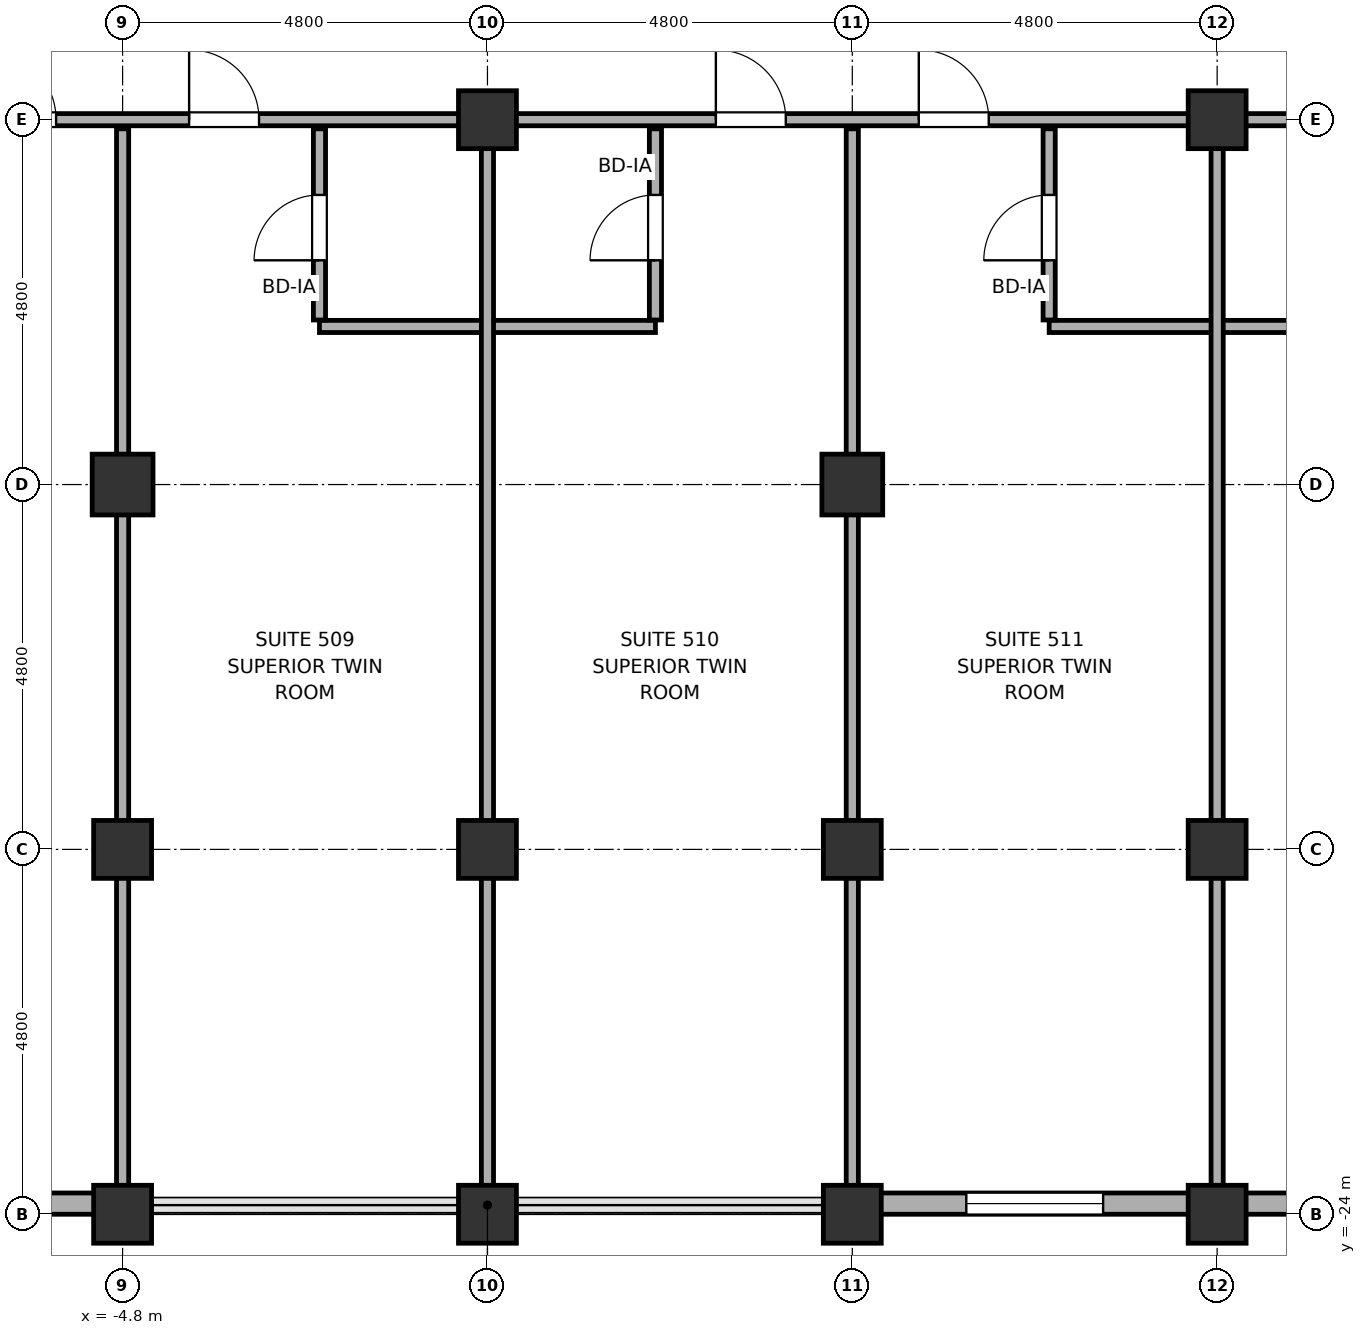
"""IFC4 building model, lengths in metres.
Left out: names, types, materials, properties, quantities, classifications, styles, units other than length and angle.
Written with IfcOpenShell. Run it as: python <this file> out.ifc"""

import sys

from ifc_helpers import new_model, si_unit, direction, frame, frame_2d, origin, origin_2d, place, context, subcontext, project, spatial, rectangle, hollow_rectangle, hollow_circle, extrude, element, fill, save


model = new_model("IFC4")
c1 = context("Model", 3, precision=1e-05, world=origin(), true_north=direction((0.0, 1.0)))
c2 = subcontext(c1, "Body", "Model", "MODEL_VIEW")
j1 = project(units=[si_unit("LENGTHUNIT", "METRE"), si_unit("PLANEANGLEUNIT", "RADIAN")], contexts=[c1])
p1 = place(None, origin())
s1 = spatial("IfcSite", under=j1, at=p1, CompositionType="ELEMENT")
p2 = place(p1, origin())
s2 = spatial("IfcBuilding", under=s1, at=p2, CompositionType="ELEMENT")
p3 = place(p2, frame((0.0, 0.0, 30.0)))
s3 = spatial("IfcBuildingStorey", under=s2, at=p3, CompositionType="ELEMENT", Elevation=30.0)
for number, where, z_axis, x_axis in (
    (1, (-4.8, -24.0, 0.0), (0.0, 0.0, 1.0), (1.0, 0.0, 0.0)),
    (2, (-4.8, -19.2, 0.0), (0.0, 0.0, 1.0), (1.0, 0.0, 0.0)),
):
    element("IfcColumn", number, at=place(p3, frame(where, z_axis=z_axis, x_axis=x_axis)), inside=s3, PredefinedType="COLUMN", context=c2, shape_type="SweptSolid", body=[
        extrude(hollow_circle(Radius=0.381, WallThickness=0.032, at=origin_2d()), origin(), (0.0, 0.0, 1.0), 3.7),
    ])
p4 = place(p3, frame((-4.8, -14.4, 0.0), z_axis=(0.0, 0.0, 1.0), x_axis=(1.0, 0.0, 0.0)))
e3 = element("IfcColumn", 3, at=p4, inside=s3, PredefinedType="COLUMN", context=c2, shape_type="SweptSolid", body=[
    extrude(hollow_rectangle(XDim=0.8, YDim=0.8, WallThickness=0.036, at=origin_2d()), origin(), (0.0, 0.0, 1.0), 3.7),
])
for number, where, z_axis, x_axis in (
    (4, (0.0, -24.0, 0.0), (0.0, 0.0, 1.0), (1.0, 0.0, 0.0)),
    (5, (0.0, -19.2, 0.0), (0.0, 0.0, 1.0), (1.0, 0.0, 0.0)),
    (6, (0.0, -9.6, 0.0), (0.0, 0.0, 1.0), (1.0, 0.0, 0.0)),
    (7, (4.8, -24.0, 0.0), (0.0, 0.0, 1.0), (1.0, 0.0, 0.0)),
    (8, (4.8, -19.2, 0.0), (0.0, 0.0, 1.0), (1.0, 0.0, 0.0)),
):
    element("IfcColumn", number, at=place(p3, frame(where, z_axis=z_axis, x_axis=x_axis)), inside=s3, PredefinedType="COLUMN", context=c2, shape_type="SweptSolid", body=[
        extrude(hollow_circle(Radius=0.381, WallThickness=0.032, at=origin_2d()), origin(), (0.0, 0.0, 1.0), 3.7),
    ])
p5 = place(p3, frame((4.8, -14.4, 0.0), z_axis=(0.0, 0.0, 1.0), x_axis=(1.0, 0.0, 0.0)))
e9 = element("IfcColumn", 9, at=p5, inside=s3, PredefinedType="COLUMN", context=c2, shape_type="SweptSolid", body=[
    extrude(hollow_rectangle(XDim=0.8, YDim=0.8, WallThickness=0.036, at=origin_2d()), origin(), (0.0, 0.0, 1.0), 3.7),
])
for number, where, z_axis, x_axis in (
    (10, (9.6, -24.0, 0.0), (0.0, 0.0, 1.0), (1.0, 0.0, 0.0)),
    (11, (9.6, -19.2, 0.0), (0.0, 0.0, 1.0), (1.0, 0.0, 0.0)),
    (12, (9.6, -9.6, 0.0), (0.0, 0.0, 1.0), (1.0, 0.0, 0.0)),
):
    element("IfcColumn", number, at=place(p3, frame(where, z_axis=z_axis, x_axis=x_axis)), inside=s3, PredefinedType="COLUMN", context=c2, shape_type="SweptSolid", body=[
        extrude(hollow_circle(Radius=0.381, WallThickness=0.032, at=origin_2d()), origin(), (0.0, 0.0, 1.0), 3.7),
    ])
p6 = place(p3, frame((-30.0, -23.86, 0.0), z_axis=(0.0, 0.0, 1.0), x_axis=(1.0, 0.0, 0.0)))
e13 = element("IfcWall", 13, at=p6, inside=s3, PredefinedType="SOLIDWALL", context=c2, shape_type="SweptSolid", body=[
    extrude(rectangle(XDim=25.25, YDim=0.28, at=frame_2d((12.625, 0.0))), origin(), (0.0, 0.0, 1.0), 2.12),
])
p7 = place(p6, frame((7.5, 0.0, 0.75)))
e14 = element("IfcOpeningElement", 14, at=p7, cuts=e13, PredefinedType="OPENING", context=c2, shape_type="SweptSolid", body=[
    extrude(rectangle(XDim=1.8, YDim=1.15, at=frame_2d((0.9, 0.575))), frame((0.0, 0.155, 0.0), z_axis=(0.0, -1.0, 0.0), x_axis=(1.0, 0.0, 0.0)), (0.0, 0.0, 1.0), 0.31),
])
p8 = place(p6, frame((12.3, 0.0, 0.75)))
e15 = element("IfcOpeningElement", 15, at=p8, cuts=e13, PredefinedType="OPENING", context=c2, shape_type="SweptSolid", body=[
    extrude(rectangle(XDim=1.8, YDim=1.15, at=frame_2d((0.9, 0.575))), frame((0.0, 0.155, 0.0), z_axis=(0.0, -1.0, 0.0), x_axis=(1.0, 0.0, 0.0)), (0.0, 0.0, 1.0), 0.31),
])
p9 = place(p6, frame((17.1, 0.0, 0.75)))
e16 = element("IfcOpeningElement", 16, at=p9, cuts=e13, PredefinedType="OPENING", context=c2, shape_type="SweptSolid", body=[
    extrude(rectangle(XDim=1.8, YDim=1.15, at=frame_2d((0.9, 0.575))), frame((0.0, 0.155, 0.0), z_axis=(0.0, -1.0, 0.0), x_axis=(1.0, 0.0, 0.0)), (0.0, 0.0, 1.0), 0.31),
])
p10 = place(p6, frame((21.9, 0.0, 0.75)))
e17 = element("IfcOpeningElement", 17, at=p10, cuts=e13, PredefinedType="OPENING", context=c2, shape_type="SweptSolid", body=[
    extrude(rectangle(XDim=1.8, YDim=1.15, at=frame_2d((0.9, 0.575))), frame((0.0, 0.155, 0.0), z_axis=(0.0, -1.0, 0.0), x_axis=(1.0, 0.0, 0.0)), (0.0, 0.0, 1.0), 0.31),
])
p11 = place(p3, frame((4.75, -23.86, 0.0), z_axis=(0.0, 0.0, 1.0), x_axis=(1.0, 0.0, 0.0)))
e18 = element("IfcWall", 18, at=p11, inside=s3, PredefinedType="SOLIDWALL", context=c2, shape_type="SweptSolid", body=[
    extrude(rectangle(XDim=20.45, YDim=0.28, at=frame_2d((10.225, 0.0))), origin(), (0.0, 0.0, 1.0), 2.12),
])
p12 = place(p11, frame((1.55, 0.0, 0.75)))
e19 = element("IfcOpeningElement", 19, at=p12, cuts=e18, PredefinedType="OPENING", context=c2, shape_type="SweptSolid", body=[
    extrude(rectangle(XDim=1.8, YDim=1.15, at=frame_2d((0.9, 0.575))), frame((0.0, 0.155, 0.0), z_axis=(0.0, -1.0, 0.0), x_axis=(1.0, 0.0, 0.0)), (0.0, 0.0, 1.0), 0.31),
])
p13 = place(p11, frame((6.35, 0.0, 0.75)))
e20 = element("IfcOpeningElement", 20, at=p13, cuts=e18, PredefinedType="OPENING", context=c2, shape_type="SweptSolid", body=[
    extrude(rectangle(XDim=1.8, YDim=1.15, at=frame_2d((0.9, 0.575))), frame((0.0, 0.155, 0.0), z_axis=(0.0, -1.0, 0.0), x_axis=(1.0, 0.0, 0.0)), (0.0, 0.0, 1.0), 0.31),
])
p14 = place(p11, frame((11.15, 0.0, 0.75)))
e21 = element("IfcOpeningElement", 21, at=p14, cuts=e18, PredefinedType="OPENING", context=c2, shape_type="SweptSolid", body=[
    extrude(rectangle(XDim=1.8, YDim=1.15, at=frame_2d((0.9, 0.575))), frame((0.0, 0.155, 0.0), z_axis=(0.0, -1.0, 0.0), x_axis=(1.0, 0.0, 0.0)), (0.0, 0.0, 1.0), 0.31),
])
p15 = place(p3, frame((-2.21, -12.32, 0.0), z_axis=(0.0, 0.0, 1.0), x_axis=(1.0, 0.0, 0.0)))
e22 = element("IfcWall", 22, at=p15, inside=s3, PredefinedType="PARTITIONING", context=c2, shape_type="SweptSolid", body=[
    extrude(rectangle(XDim=4.42, YDim=0.16, at=frame_2d((2.21, 0.0))), origin(), (0.0, 0.0, 1.0), 3.02),
])
p16 = place(p3, frame((7.39, -12.32, 0.0), z_axis=(0.0, 0.0, 1.0), x_axis=(1.0, 0.0, 0.0)))
e23 = element("IfcWall", 23, at=p16, inside=s3, PredefinedType="PARTITIONING", context=c2, shape_type="SweptSolid", body=[
    extrude(rectangle(XDim=4.42, YDim=0.16, at=frame_2d((2.21, 0.0))), origin(), (0.0, 0.0, 1.0), 3.02),
])
p17 = place(p3, frame((-33.31, -9.6, 0.0), z_axis=(0.0, 0.0, 1.0), x_axis=(1.0, 0.0, 0.0)))
e24 = element("IfcWall", 24, at=p17, inside=s3, PredefinedType="PARTITIONING", context=c2, shape_type="SweptSolid", body=[
    extrude(rectangle(XDim=61.82, YDim=0.16, at=frame_2d((30.91, 0.0))), origin(), (0.0, 0.0, 1.0), 2.12),
])
p18 = place(p17, frame((6.679, 0.0, 0.0)))
e25 = element("IfcOpeningElement", 25, at=p18, cuts=e24, PredefinedType="OPENING", context=c2, shape_type="SweptSolid", body=[
    extrude(rectangle(XDim=0.9, YDim=2.02, at=frame_2d((0.45, 1.01))), frame((0.0, 0.095, 0.0), z_axis=(0.0, -1.0, 0.0), x_axis=(1.0, 0.0, 0.0)), (0.0, 0.0, 1.0), 0.19),
])
p19 = place(p17, frame((54.24, 0.0, 0.0)))
e26 = element("IfcOpeningElement", 26, at=p19, cuts=e24, PredefinedType="OPENING", context=c2, shape_type="SweptSolid", body=[
    extrude(rectangle(XDim=0.9, YDim=2.02, at=frame_2d((0.45, 1.01))), frame((0.0, 0.095, 0.0), z_axis=(0.0, -1.0, 0.0), x_axis=(1.0, 0.0, 0.0)), (0.0, 0.0, 1.0), 0.19),
])
p20 = place(p17, frame((10.68, 0.0, 0.0)))
e27 = element("IfcOpeningElement", 27, at=p20, cuts=e24, PredefinedType="OPENING", context=c2, shape_type="SweptSolid", body=[
    extrude(rectangle(XDim=0.92, YDim=2.02, at=frame_2d((0.46, 1.01))), frame((0.0, 0.095, 0.0), z_axis=(0.0, -1.0, 0.0), x_axis=(1.0, 0.0, 0.0)), (0.0, 0.0, 1.0), 0.19),
])
p21 = place(p17, frame((17.115, 0.0, 0.0)))
e28 = element("IfcOpeningElement", 28, at=p21, cuts=e24, PredefinedType="OPENING", context=c2, shape_type="SweptSolid", body=[
    extrude(rectangle(XDim=0.92, YDim=2.02, at=frame_2d((0.46, 1.01))), frame((0.0, 0.095, 0.0), z_axis=(0.0, -1.0, 0.0), x_axis=(1.0, 0.0, 0.0)), (0.0, 0.0, 1.0), 0.19),
])
p22 = place(p17, frame((19.785, 0.0, 0.0)))
e29 = element("IfcOpeningElement", 29, at=p22, cuts=e24, PredefinedType="OPENING", context=c2, shape_type="SweptSolid", body=[
    extrude(rectangle(XDim=0.92, YDim=2.02, at=frame_2d((0.46, 1.01))), frame((0.0, 0.095, 0.0), z_axis=(0.0, -1.0, 0.0), x_axis=(1.0, 0.0, 0.0)), (0.0, 0.0, 1.0), 0.19),
])
p23 = place(p17, frame((26.715, 0.0, 0.0)))
e30 = element("IfcOpeningElement", 30, at=p23, cuts=e24, PredefinedType="OPENING", context=c2, shape_type="SweptSolid", body=[
    extrude(rectangle(XDim=0.92, YDim=2.02, at=frame_2d((0.46, 1.01))), frame((0.0, 0.095, 0.0), z_axis=(0.0, -1.0, 0.0), x_axis=(1.0, 0.0, 0.0)), (0.0, 0.0, 1.0), 0.19),
])
p24 = place(p17, frame((29.385, 0.0, 0.0)))
e31 = element("IfcOpeningElement", 31, at=p24, cuts=e24, PredefinedType="OPENING", context=c2, shape_type="SweptSolid", body=[
    extrude(rectangle(XDim=0.92, YDim=2.02, at=frame_2d((0.46, 1.01))), frame((0.0, 0.095, 0.0), z_axis=(0.0, -1.0, 0.0), x_axis=(1.0, 0.0, 0.0)), (0.0, 0.0, 1.0), 0.19),
])
p25 = place(p17, frame((36.315, 0.0, 0.0)))
e32 = element("IfcOpeningElement", 32, at=p25, cuts=e24, PredefinedType="OPENING", context=c2, shape_type="SweptSolid", body=[
    extrude(rectangle(XDim=0.92, YDim=2.02, at=frame_2d((0.46, 1.01))), frame((0.0, 0.095, 0.0), z_axis=(0.0, -1.0, 0.0), x_axis=(1.0, 0.0, 0.0)), (0.0, 0.0, 1.0), 0.19),
])
p26 = place(p17, frame((38.985, 0.0, 0.0)))
e33 = element("IfcOpeningElement", 33, at=p26, cuts=e24, PredefinedType="OPENING", context=c2, shape_type="SweptSolid", body=[
    extrude(rectangle(XDim=0.92, YDim=2.02, at=frame_2d((0.46, 1.01))), frame((0.0, 0.095, 0.0), z_axis=(0.0, -1.0, 0.0), x_axis=(1.0, 0.0, 0.0)), (0.0, 0.0, 1.0), 0.19),
])
p27 = place(p17, frame((45.915, 0.0, 0.0)))
e34 = element("IfcOpeningElement", 34, at=p27, cuts=e24, PredefinedType="OPENING", context=c2, shape_type="SweptSolid", body=[
    extrude(rectangle(XDim=0.92, YDim=2.02, at=frame_2d((0.46, 1.01))), frame((0.0, 0.095, 0.0), z_axis=(0.0, -1.0, 0.0), x_axis=(1.0, 0.0, 0.0)), (0.0, 0.0, 1.0), 0.19),
])
p28 = place(p17, frame((48.585, 0.0, 0.0)))
e35 = element("IfcOpeningElement", 35, at=p28, cuts=e24, PredefinedType="OPENING", context=c2, shape_type="SweptSolid", body=[
    extrude(rectangle(XDim=0.92, YDim=2.02, at=frame_2d((0.46, 1.01))), frame((0.0, 0.095, 0.0), z_axis=(0.0, -1.0, 0.0), x_axis=(1.0, 0.0, 0.0)), (0.0, 0.0, 1.0), 0.19),
])
p29 = place(p3, frame((-4.8, -23.71, 0.0), z_axis=(0.0, 0.0, 1.0), x_axis=(0.0, 1.0, 0.0)))
e36 = element("IfcWall", 36, at=p29, inside=s3, PredefinedType="PARTITIONING", context=c2, shape_type="SweptSolid", body=[
    extrude(rectangle(XDim=13.99, YDim=0.16, at=frame_2d((6.995, 0.0))), origin(), (0.0, 0.0, 1.0), 2.12),
])
p30 = place(p3, frame((-2.21, -12.235, 0.0), z_axis=(0.0, 0.0, 1.0), x_axis=(0.0, 1.0, 0.0)))
e37 = element("IfcWall", 37, at=p30, inside=s3, PredefinedType="PARTITIONING", context=c2, shape_type="SweptSolid", body=[
    extrude(rectangle(XDim=2.515, YDim=0.16, at=frame_2d((1.258, 0.0))), origin(), (0.0, 0.0, 1.0), 2.12),
])
p31 = place(p30, frame((0.785, 0.0, 0.0)))
e38 = element("IfcOpeningElement", 38, at=p31, cuts=e37, PredefinedType="OPENING", context=c2, shape_type="SweptSolid", body=[
    extrude(rectangle(XDim=0.86, YDim=2.02, at=frame_2d((0.43, 1.01))), frame((0.0, 0.095, 0.0), z_axis=(0.0, -1.0, 0.0), x_axis=(1.0, 0.0, 0.0)), (0.0, 0.0, 1.0), 0.19),
])
p32 = place(p3, frame((0.0, -23.795, 0.0), z_axis=(0.0, 0.0, 1.0), x_axis=(0.0, 1.0, 0.0)))
e39 = element("IfcWall", 39, at=p32, inside=s3, PredefinedType="PARTITIONING", context=c2, shape_type="SweptSolid", body=[
    extrude(rectangle(XDim=14.075, YDim=0.16, at=frame_2d((7.038, 0.0))), origin(), (0.0, 0.0, 1.0), 2.12),
])
p33 = place(p3, frame((2.21, -12.235, 0.0), z_axis=(0.0, 0.0, 1.0), x_axis=(0.0, 1.0, 0.0)))
e40 = element("IfcWall", 40, at=p33, inside=s3, PredefinedType="PARTITIONING", context=c2, shape_type="SweptSolid", body=[
    extrude(rectangle(XDim=2.515, YDim=0.16, at=frame_2d((1.258, 0.0))), origin(), (0.0, 0.0, 1.0), 2.12),
])
p34 = place(p33, frame((0.785, 0.0, 0.0)))
e41 = element("IfcOpeningElement", 41, at=p34, cuts=e40, PredefinedType="OPENING", context=c2, shape_type="SweptSolid", body=[
    extrude(rectangle(XDim=0.86, YDim=2.02, at=frame_2d((0.43, 1.01))), frame((0.0, 0.095, 0.0), z_axis=(0.0, -1.0, 0.0), x_axis=(1.0, 0.0, 0.0)), (0.0, 0.0, 1.0), 0.19),
])
p35 = place(p3, frame((4.8, -23.71, 0.0), z_axis=(0.0, 0.0, 1.0), x_axis=(0.0, 1.0, 0.0)))
e42 = element("IfcWall", 42, at=p35, inside=s3, PredefinedType="PARTITIONING", context=c2, shape_type="SweptSolid", body=[
    extrude(rectangle(XDim=13.99, YDim=0.16, at=frame_2d((6.995, 0.0))), origin(), (0.0, 0.0, 1.0), 2.12),
])
p36 = place(p3, frame((7.39, -12.235, 0.0), z_axis=(0.0, 0.0, 1.0), x_axis=(0.0, 1.0, 0.0)))
e43 = element("IfcWall", 43, at=p36, inside=s3, PredefinedType="PARTITIONING", context=c2, shape_type="SweptSolid", body=[
    extrude(rectangle(XDim=2.515, YDim=0.16, at=frame_2d((1.258, 0.0))), origin(), (0.0, 0.0, 1.0), 2.12),
])
p37 = place(p36, frame((0.785, 0.0, 0.0)))
e44 = element("IfcOpeningElement", 44, at=p37, cuts=e43, PredefinedType="OPENING", context=c2, shape_type="SweptSolid", body=[
    extrude(rectangle(XDim=0.86, YDim=2.02, at=frame_2d((0.43, 1.01))), frame((0.0, 0.095, 0.0), z_axis=(0.0, -1.0, 0.0), x_axis=(1.0, 0.0, 0.0)), (0.0, 0.0, 1.0), 0.19),
])
p38 = place(p3, frame((9.6, -23.71, 0.0), z_axis=(0.0, 0.0, 1.0), x_axis=(0.0, 1.0, 0.0)))
e45 = element("IfcWall", 45, at=p38, inside=s3, PredefinedType="PARTITIONING", context=c2, shape_type="SweptSolid", body=[
    extrude(rectangle(XDim=13.99, YDim=0.16, at=frame_2d((6.995, 0.0))), origin(), (0.0, 0.0, 1.0), 2.12),
])
p39 = place(p12, origin())
e46 = element("IfcWindow", 46, at=p39, inside=s3, PartitioningType="SINGLE_PANEL", PredefinedType="WINDOW", context=c2, shape_type="SweptSolid", body=[
    extrude(rectangle(XDim=1.8, YDim=1.15, at=frame_2d((0.9, 0.575))), frame((0.0, 0.03, 0.0), z_axis=(0.0, -1.0, 0.0), x_axis=(1.0, 0.0, 0.0)), (0.0, 0.0, 1.0), 0.06),
])
fill(e19, e46)
p40 = place(p23, origin())
e47 = element("IfcDoor", 47, at=p40, inside=s3, OperationType="SINGLE_SWING_RIGHT", PredefinedType="DOOR", context=c2, shape_type="SweptSolid", body=[
    extrude(rectangle(XDim=0.92, YDim=2.02, at=frame_2d((0.46, 1.01))), frame((0.0, 0.025, 0.0), z_axis=(0.0, -1.0, 0.0), x_axis=(1.0, 0.0, 0.0)), (0.0, 0.0, 1.0), 0.05),
])
fill(e30, e47)
p41 = place(p24, origin())
e48 = element("IfcDoor", 48, at=p41, inside=s3, OperationType="SINGLE_SWING_LEFT", PredefinedType="DOOR", context=c2, shape_type="SweptSolid", body=[
    extrude(rectangle(XDim=0.92, YDim=2.02, at=frame_2d((0.46, 1.01))), frame((0.0, 0.025, 0.0), z_axis=(0.0, -1.0, 0.0), x_axis=(1.0, 0.0, 0.0)), (0.0, 0.0, 1.0), 0.05),
])
fill(e31, e48)
p42 = place(p31, origin())
e49 = element("IfcDoor", 49, at=p42, inside=s3, OperationType="SINGLE_SWING_RIGHT", PredefinedType="DOOR", context=c2, shape_type="SweptSolid", body=[
    extrude(rectangle(XDim=0.86, YDim=2.02, at=frame_2d((0.43, 1.01))), frame((0.0, 0.025, 0.0), z_axis=(0.0, -1.0, 0.0), x_axis=(1.0, 0.0, 0.0)), (0.0, 0.0, 1.0), 0.05),
])
fill(e38, e49)
p43 = place(p25, origin())
e50 = element("IfcDoor", 50, at=p43, inside=s3, OperationType="SINGLE_SWING_LEFT", PredefinedType="DOOR", context=c2, shape_type="SweptSolid", body=[
    extrude(rectangle(XDim=0.92, YDim=2.02, at=frame_2d((0.46, 1.01))), frame((0.0, 0.025, 0.0), z_axis=(0.0, -1.0, 0.0), x_axis=(1.0, 0.0, 0.0)), (0.0, 0.0, 1.0), 0.05),
])
fill(e32, e50)
p44 = place(p34, origin())
e51 = element("IfcDoor", 51, at=p44, inside=s3, OperationType="SINGLE_SWING_LEFT", PredefinedType="DOOR", context=c2, shape_type="SweptSolid", body=[
    extrude(rectangle(XDim=0.86, YDim=2.02, at=frame_2d((0.43, 1.01))), frame((0.0, 0.025, 0.0), z_axis=(0.0, -1.0, 0.0), x_axis=(1.0, 0.0, 0.0)), (0.0, 0.0, 1.0), 0.05),
])
fill(e41, e51)
p45 = place(p26, origin())
e52 = element("IfcDoor", 52, at=p45, inside=s3, OperationType="SINGLE_SWING_RIGHT", PredefinedType="DOOR", context=c2, shape_type="SweptSolid", body=[
    extrude(rectangle(XDim=0.92, YDim=2.02, at=frame_2d((0.46, 1.01))), frame((0.0, 0.025, 0.0), z_axis=(0.0, -1.0, 0.0), x_axis=(1.0, 0.0, 0.0)), (0.0, 0.0, 1.0), 0.05),
])
fill(e33, e52)
p46 = place(p37, origin())
e53 = element("IfcDoor", 53, at=p46, inside=s3, OperationType="SINGLE_SWING_LEFT", PredefinedType="DOOR", context=c2, shape_type="SweptSolid", body=[
    extrude(rectangle(XDim=0.86, YDim=2.02, at=frame_2d((0.43, 1.01))), frame((0.0, 0.025, 0.0), z_axis=(0.0, -1.0, 0.0), x_axis=(1.0, 0.0, 0.0)), (0.0, 0.0, 1.0), 0.05),
])
fill(e44, e53)
save(model, sys.argv[1])
